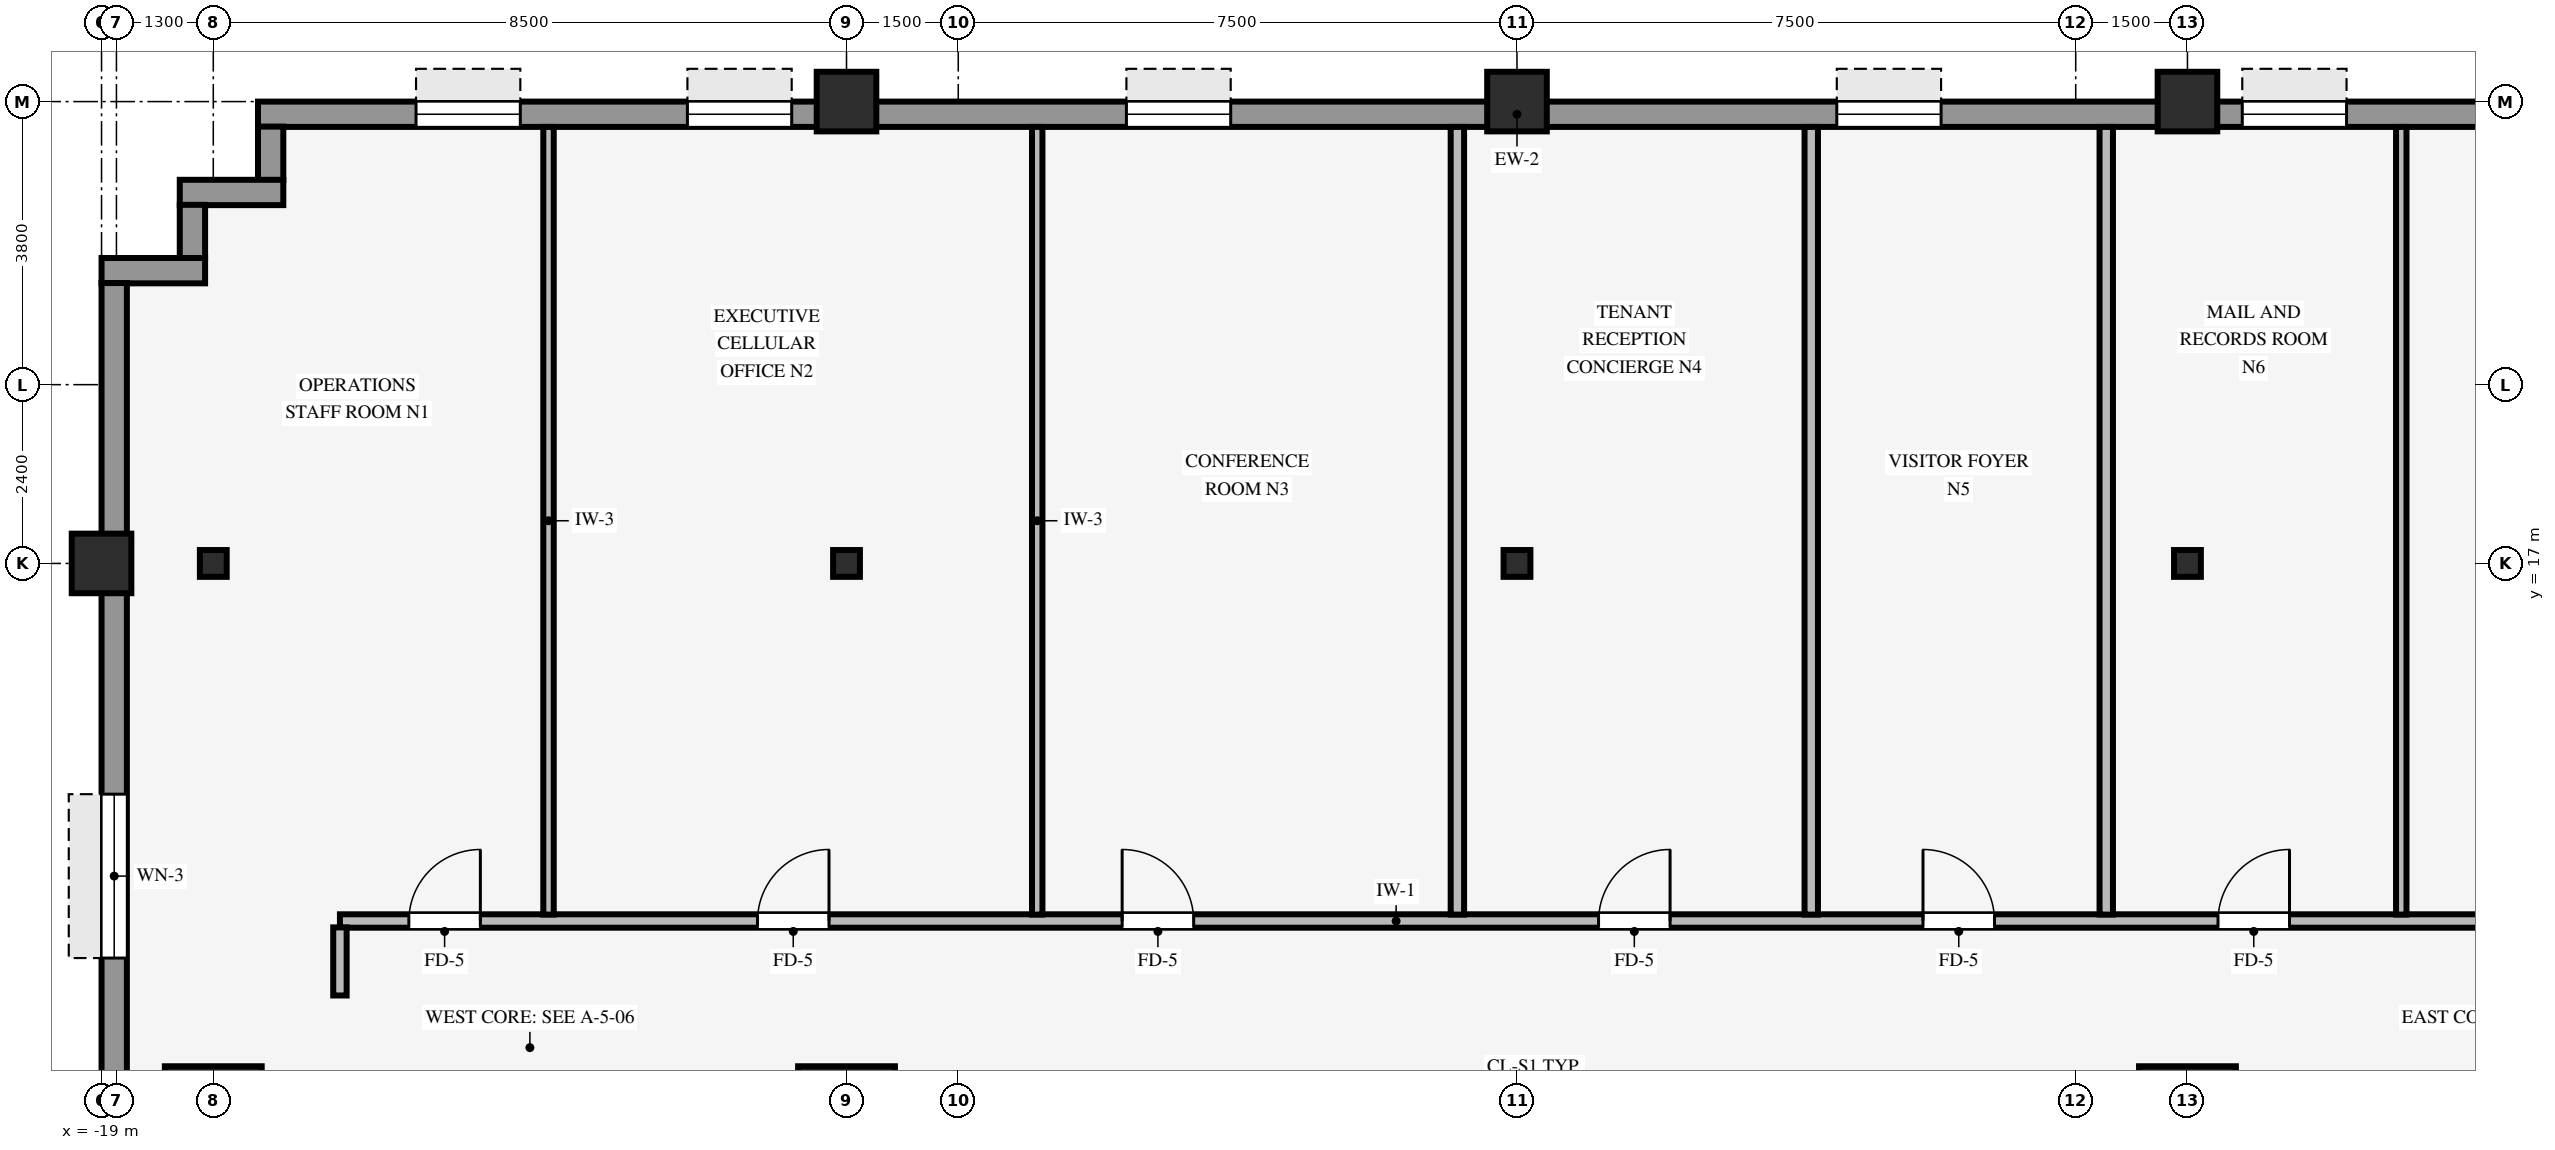
"""IFC4 building model, lengths in metres.
Left out: names, types, materials, properties, quantities, classifications, styles, units other than length and angle.
Written with IfcOpenShell. Run it as: python <this file> out.ifc"""

import sys

from ifc_helpers import new_model, si_unit, direction, frame, frame_2d, origin, origin_2d, place, context, subcontext, project, spatial, rectangle, hollow_rectangle, i_section, extrude, source, transform, mapped, element, fill, save


model = new_model("IFC4")
c1 = context("Model", 3, precision=1e-05, world=origin(), true_north=direction((0.0, 1.0)))
c2 = subcontext(c1, "Body", "Model", "MODEL_VIEW")
j1 = project(units=[si_unit("LENGTHUNIT", "METRE"), si_unit("PLANEANGLEUNIT", "RADIAN")], contexts=[c1])
p1 = place(None, origin())
s1 = spatial("IfcSite", under=j1, at=p1, CompositionType="ELEMENT")
p2 = place(p1, origin())
s2 = spatial("IfcBuilding", under=s1, at=p2, CompositionType="ELEMENT")
p3 = place(p2, frame((0.0, 0.0, 53.15)))
s3 = spatial("IfcBuildingStorey", under=s2, at=p3, CompositionType="ELEMENT", Elevation=53.15)
for number, where, z_axis, x_axis in (
    (1, (-17.5, 9.6, 0.0), (0.0, 0.0, 1.0), (1.0, 0.0, 0.0)),
    (2, (-9.0, 9.6, 0.0), (0.0, 0.0, 1.0), (1.0, 0.0, 0.0)),
    (3, (9.0, 9.6, 0.0), (0.0, 0.0, 1.0), (1.0, 0.0, 0.0)),
):
    element("IfcColumn", number, at=place(p3, frame(where, z_axis=z_axis, x_axis=x_axis)), inside=s3, PredefinedType="COLUMN", context=c2, shape_type="SweptSolid", body=[
        extrude(rectangle(XDim=1.3, YDim=1.3, at=origin_2d()), origin(), (0.0, 0.0, 1.0), 3.25),
    ])
for number, where, z_axis, x_axis in (
    (4, (-19.0, 17.0, 0.0), (0.0, 0.0, 1.0), (1.0, 0.0, 0.0)),
    (5, (-9.0, 23.2, 0.0), (0.0, 0.0, 1.0), (1.0, 0.0, 0.0)),
    (6, (0.0, 23.2, 0.0), (0.0, 0.0, 1.0), (1.0, 0.0, 0.0)),
    (7, (9.0, 23.2, 0.0), (0.0, 0.0, 1.0), (1.0, 0.0, 0.0)),
):
    element("IfcColumn", number, at=place(p3, frame(where, z_axis=z_axis, x_axis=x_axis)), inside=s3, PredefinedType="COLUMN", context=c2, shape_type="SweptSolid", body=[
        extrude(hollow_rectangle(XDim=0.8, YDim=0.8, WallThickness=0.055, InnerFilletRadius=0.055, OuterFilletRadius=0.11, at=origin_2d()), origin(), (0.0, 0.0, 1.0), 3.25),
    ])
for number, where, z_axis, x_axis in (
    (8, (0.0, 17.0, 0.0), (0.0, 0.0, 1.0), (1.0, 0.0, 0.0)),
    (9, (-17.5, 17.0, 0.0), (0.0, 0.0, 1.0), (1.0, 0.0, 0.0)),
    (10, (-9.0, 17.0, 0.0), (0.0, 0.0, 1.0), (1.0, 0.0, 0.0)),
    (11, (9.0, 17.0, 0.0), (0.0, 0.0, 1.0), (1.0, 0.0, 0.0)),
):
    element("IfcColumn", number, at=place(p3, frame(where, z_axis=z_axis, x_axis=x_axis)), inside=s3, PredefinedType="COLUMN", context=c2, shape_type="SweptSolid", body=[
        extrude(i_section(OverallWidth=0.36, OverallDepth=0.36, WebThickness=0.021, FlangeThickness=0.021, FilletRadius=0.018, at=origin_2d()), origin(), (0.0, 0.0, 1.0), 3.25),
    ])
p4 = place(p3, frame((-16.9, 23.03, 0.0), z_axis=(0.0, 0.0, 1.0), x_axis=(1.0, 0.0, 0.0)))
e12 = element("IfcWall", 12, at=p4, inside=s3, PredefinedType="STANDARD", context=c2, shape_type="SweptSolid", body=[
    extrude(rectangle(XDim=33.8, YDim=0.34, at=frame_2d((16.9, 0.0))), origin(), (0.0, 0.0, 1.0), 2.585),
])
p5 = place(p4, frame((2.121, 0.0, 0.8)))
e13 = element("IfcOpeningElement", 13, at=p5, cuts=e12, PredefinedType="OPENING", context=c2, shape_type="SweptSolid", body=[
    extrude(rectangle(XDim=1.4, YDim=1.65, at=frame_2d((0.7, 0.825))), frame((0.0, 0.18, 0.0), z_axis=(0.0, -1.0, 0.0), x_axis=(1.0, 0.0, 0.0)), (0.0, 0.0, 1.0), 0.36),
])
p6 = place(p4, frame((5.764, 0.0, 0.8)))
e14 = element("IfcOpeningElement", 14, at=p6, cuts=e12, PredefinedType="OPENING", context=c2, shape_type="SweptSolid", body=[
    extrude(rectangle(XDim=1.4, YDim=1.65, at=frame_2d((0.7, 0.825))), frame((0.0, 0.18, 0.0), z_axis=(0.0, -1.0, 0.0), x_axis=(1.0, 0.0, 0.0)), (0.0, 0.0, 1.0), 0.36),
])
p7 = place(p4, frame((11.657, 0.0, 0.8)))
e15 = element("IfcOpeningElement", 15, at=p7, cuts=e12, PredefinedType="OPENING", context=c2, shape_type="SweptSolid", body=[
    extrude(rectangle(XDim=1.4, YDim=1.65, at=frame_2d((0.7, 0.825))), frame((0.0, 0.18, 0.0), z_axis=(0.0, -1.0, 0.0), x_axis=(1.0, 0.0, 0.0)), (0.0, 0.0, 1.0), 0.36),
])
p8 = place(p4, frame((21.193, 0.0, 0.8)))
e16 = element("IfcOpeningElement", 16, at=p8, cuts=e12, PredefinedType="OPENING", context=c2, shape_type="SweptSolid", body=[
    extrude(rectangle(XDim=1.4, YDim=1.65, at=frame_2d((0.7, 0.825))), frame((0.0, 0.18, 0.0), z_axis=(0.0, -1.0, 0.0), x_axis=(1.0, 0.0, 0.0)), (0.0, 0.0, 1.0), 0.36),
])
p9 = place(p4, frame((26.636, 0.0, 0.8)))
e17 = element("IfcOpeningElement", 17, at=p9, cuts=e12, PredefinedType="OPENING", context=c2, shape_type="SweptSolid", body=[
    extrude(rectangle(XDim=1.4, YDim=1.65, at=frame_2d((0.7, 0.825))), frame((0.0, 0.18, 0.0), z_axis=(0.0, -1.0, 0.0), x_axis=(1.0, 0.0, 0.0)), (0.0, 0.0, 1.0), 0.36),
])
p10 = place(p4, frame((29.829, 0.0, 0.8)))
e18 = element("IfcOpeningElement", 18, at=p10, cuts=e12, PredefinedType="OPENING", context=c2, shape_type="SweptSolid", body=[
    extrude(rectangle(XDim=1.4, YDim=1.65, at=frame_2d((0.7, 0.825))), frame((0.0, 0.18, 0.0), z_axis=(0.0, -1.0, 0.0), x_axis=(1.0, 0.0, 0.0)), (0.0, 0.0, 1.0), 0.36),
])
p11 = place(p3, frame((-16.73, 22.146, 0.0), z_axis=(0.0, 0.0, 1.0), x_axis=(0.0, 1.0, 0.0)))
e19 = element("IfcWall", 19, at=p11, inside=s3, PredefinedType="STANDARD", context=c2, shape_type="SweptSolid", body=[
    extrude(rectangle(XDim=0.718, YDim=0.34, at=frame_2d((0.359, 0.0))), origin(), (0.0, 0.0, 1.0), 3.24),
])
p12 = place(p3, frame((-17.95, 21.98, 0.0), z_axis=(0.0, 0.0, 1.0), x_axis=(1.0, 0.0, 0.0)))
e20 = element("IfcWall", 20, at=p12, inside=s3, PredefinedType="STANDARD", context=c2, shape_type="SweptSolid", body=[
    extrude(rectangle(XDim=1.39, YDim=0.34, at=frame_2d((0.695, 0.0))), origin(), (0.0, 0.0, 1.0), 3.24),
])
p13 = place(p3, frame((-17.78, 21.096, 0.0), z_axis=(0.0, 0.0, 1.0), x_axis=(0.0, 1.0, 0.0)))
e21 = element("IfcWall", 21, at=p13, inside=s3, PredefinedType="STANDARD", context=c2, shape_type="SweptSolid", body=[
    extrude(rectangle(XDim=0.718, YDim=0.34, at=frame_2d((0.359, 0.0))), origin(), (0.0, 0.0, 1.0), 3.24),
])
p14 = place(p3, frame((-19.0, 20.93, 0.0), z_axis=(0.0, 0.0, 1.0), x_axis=(1.0, 0.0, 0.0)))
e22 = element("IfcWall", 22, at=p14, inside=s3, PredefinedType="STANDARD", context=c2, shape_type="SweptSolid", body=[
    extrude(rectangle(XDim=1.39, YDim=0.34, at=frame_2d((0.695, 0.0))), origin(), (0.0, 0.0, 1.0), 3.24),
])
p15 = place(p3, frame((-18.83, -20.764, 0.0), z_axis=(0.0, 0.0, 1.0), x_axis=(0.0, 1.0, 0.0)))
e23 = element("IfcWall", 23, at=p15, inside=s3, PredefinedType="STANDARD", context=c2, shape_type="SweptSolid", body=[
    extrude(rectangle(XDim=41.528, YDim=0.34, at=frame_2d((20.764, 0.0))), origin(), (0.0, 0.0, 1.0), 3.24),
])
p16 = place(p15, frame((6.864, 0.0, 0.0)))
e24 = element("IfcOpeningElement", 24, at=p16, cuts=e23, PredefinedType="OPENING", context=c2, shape_type="SweptSolid", body=[
    extrude(rectangle(XDim=1.05, YDim=2.1, at=frame_2d((0.525, 1.05))), frame((0.0, 0.18, 0.0), z_axis=(0.0, -1.0, 0.0), x_axis=(1.0, 0.0, 0.0)), (0.0, 0.0, 1.0), 0.36),
])
p17 = place(p15, frame((32.467, 0.0, 0.8)))
e25 = element("IfcOpeningElement", 25, at=p17, cuts=e23, PredefinedType="OPENING", context=c2, shape_type="SweptSolid", body=[
    extrude(rectangle(XDim=2.2, YDim=1.65, at=frame_2d((1.1, 0.825))), frame((0.0, 0.18, 0.0), z_axis=(0.0, -1.0, 0.0), x_axis=(1.0, 0.0, 0.0)), (0.0, 0.0, 1.0), 0.36),
])
p18 = place(p3, frame((-15.8, 12.2, 0.0), z_axis=(0.0, 0.0, 1.0), x_axis=(1.0, 0.0, 0.0)))
e26 = element("IfcWall", 26, at=p18, inside=s3, PredefinedType="PARTITIONING", context=c2, shape_type="SweptSolid", body=[
    extrude(rectangle(XDim=31.6, YDim=0.18, at=frame_2d((15.8, 0.0))), origin(), (0.0, 0.0, 1.0), 3.24),
])
p19 = place(p18, frame((5.605, 0.0, 0.0)))
e27 = element("IfcOpeningElement", 27, at=p19, cuts=e26, PredefinedType="OPENING", context=c2, shape_type="SweptSolid", body=[
    extrude(rectangle(XDim=0.96, YDim=2.1, at=frame_2d((0.48, 1.05))), frame((0.0, 0.1, 0.0), z_axis=(0.0, -1.0, 0.0), x_axis=(1.0, 0.0, 0.0)), (0.0, 0.0, 1.0), 0.2),
])
p20 = place(p18, frame((16.895, 0.0, 0.0)))
e28 = element("IfcOpeningElement", 28, at=p20, cuts=e26, PredefinedType="OPENING", context=c2, shape_type="SweptSolid", body=[
    extrude(rectangle(XDim=0.96, YDim=2.1, at=frame_2d((0.48, 1.05))), frame((0.0, 0.1, 0.0), z_axis=(0.0, -1.0, 0.0), x_axis=(1.0, 0.0, 0.0)), (0.0, 0.0, 1.0), 0.2),
])
p21 = place(p18, frame((21.25, 0.0, 0.0)))
e29 = element("IfcOpeningElement", 29, at=p21, cuts=e26, PredefinedType="OPENING", context=c2, shape_type="SweptSolid", body=[
    extrude(rectangle(XDim=0.96, YDim=2.1, at=frame_2d((0.48, 1.05))), frame((0.0, 0.1, 0.0), z_axis=(0.0, -1.0, 0.0), x_axis=(1.0, 0.0, 0.0)), (0.0, 0.0, 1.0), 0.2),
])
p22 = place(p18, frame((25.21, 0.0, 0.0)))
e30 = element("IfcOpeningElement", 30, at=p22, cuts=e26, PredefinedType="OPENING", context=c2, shape_type="SweptSolid", body=[
    extrude(rectangle(XDim=0.96, YDim=2.1, at=frame_2d((0.48, 1.05))), frame((0.0, 0.1, 0.0), z_axis=(0.0, -1.0, 0.0), x_axis=(1.0, 0.0, 0.0)), (0.0, 0.0, 1.0), 0.2),
])
p23 = place(p18, frame((29.155, 0.0, 0.0)))
e31 = element("IfcOpeningElement", 31, at=p23, cuts=e26, PredefinedType="OPENING", context=c2, shape_type="SweptSolid", body=[
    extrude(rectangle(XDim=0.96, YDim=2.1, at=frame_2d((0.48, 1.05))), frame((0.0, 0.1, 0.0), z_axis=(0.0, -1.0, 0.0), x_axis=(1.0, 0.0, 0.0)), (0.0, 0.0, 1.0), 0.2),
])
p24 = place(p18, frame((10.5, 0.0, 0.0)))
e32 = element("IfcOpeningElement", 32, at=p24, cuts=e26, PredefinedType="OPENING", context=c2, shape_type="SweptSolid", body=[
    extrude(rectangle(XDim=0.96, YDim=2.1, at=frame_2d((0.48, 1.05))), frame((0.0, 0.1, 0.0), z_axis=(0.0, -1.0, 0.0), x_axis=(1.0, 0.0, 0.0)), (0.0, 0.0, 1.0), 0.2),
])
p25 = place(p18, frame((0.925, 0.0, 0.0)))
e33 = element("IfcOpeningElement", 33, at=p25, cuts=e26, PredefinedType="OPENING", context=c2, shape_type="SweptSolid", body=[
    extrude(rectangle(XDim=0.96, YDim=2.1, at=frame_2d((0.48, 1.05))), frame((0.0, 0.1, 0.0), z_axis=(0.0, -1.0, 0.0), x_axis=(1.0, 0.0, 0.0)), (0.0, 0.0, 1.0), 0.2),
])
p26 = place(p3, frame((-15.8, 11.2, 0.0), z_axis=(0.0, 0.0, 1.0), x_axis=(0.0, 1.0, 0.0)))
e34 = element("IfcWall", 34, at=p26, inside=s3, PredefinedType="PARTITIONING", context=c2, shape_type="SweptSolid", body=[
    extrude(rectangle(XDim=0.914, YDim=0.18, at=frame_2d((0.457, 0.0))), origin(), (0.0, 0.0, 1.0), 3.24),
])
for number, where, z_axis, x_axis in (
    (35, (-13.0, 12.286, 0.0), (0.0, 0.0, 1.0), (0.0, 1.0, 0.0)),
    (36, (-6.44, 12.286, 0.0), (0.0, 0.0, 1.0), (0.0, 1.0, 0.0)),
):
    element("IfcWall", number, at=place(p3, frame(where, z_axis=z_axis, x_axis=x_axis)), inside=s3, PredefinedType="PARTITIONING", context=c2, shape_type="SweptSolid", body=[
        extrude(rectangle(XDim=10.574, YDim=0.14, at=frame_2d((5.287, 0.0))), origin(), (0.0, 0.0, 1.0), 3.24),
    ])
for number, where, z_axis, x_axis in (
    (37, (-0.8, 12.286, 0.0), (0.0, 0.0, 1.0), (0.0, 1.0, 0.0)),
    (38, (3.95, 12.286, 0.0), (0.0, 0.0, 1.0), (0.0, 1.0, 0.0)),
    (39, (7.91, 12.286, 0.0), (0.0, 0.0, 1.0), (0.0, 1.0, 0.0)),
):
    element("IfcWall", number, at=place(p3, frame(where, z_axis=z_axis, x_axis=x_axis)), inside=s3, PredefinedType="PARTITIONING", context=c2, shape_type="SweptSolid", body=[
        extrude(rectangle(XDim=10.574, YDim=0.18, at=frame_2d((5.287, 0.0))), origin(), (0.0, 0.0, 1.0), 3.24),
    ])
p27 = place(p3, frame((11.87, 12.286, 0.0), z_axis=(0.0, 0.0, 1.0), x_axis=(0.0, 1.0, 0.0)))
e40 = element("IfcWall", 40, at=p27, inside=s3, PredefinedType="PARTITIONING", context=c2, shape_type="SweptSolid", body=[
    extrude(rectangle(XDim=10.574, YDim=0.14, at=frame_2d((5.287, 0.0))), origin(), (0.0, 0.0, 1.0), 3.24),
])
m1 = source(origin(), c2, "Body", "SweptSolid", [
    extrude(rectangle(XDim=1.4, YDim=1.65, at=frame_2d((0.7, 0.825))), frame((0.0, 0.03, 0.0), z_axis=(0.0, -1.0, 0.0), x_axis=(1.0, 0.0, 0.0)), (0.0, 0.0, 1.0), 0.06),
])
p28 = place(p5, origin())
e41 = element("IfcWindow", 41, at=p28, inside=s3, PartitioningType="SINGLE_PANEL", PredefinedType="WINDOW", context=c2, shape_type="MappedRepresentation", body=[
    mapped(m1, transform((0.0, 0.0, 0.0), scale=1.0)),
])
fill(e13, e41)
p29 = place(p6, origin())
e42 = element("IfcWindow", 42, at=p29, inside=s3, PartitioningType="SINGLE_PANEL", PredefinedType="WINDOW", context=c2, shape_type="MappedRepresentation", body=[
    mapped(m1, transform((0.0, 0.0, 0.0), scale=1.0)),
])
fill(e14, e42)
p30 = place(p7, origin())
e43 = element("IfcWindow", 43, at=p30, inside=s3, PartitioningType="SINGLE_PANEL", PredefinedType="WINDOW", context=c2, shape_type="MappedRepresentation", body=[
    mapped(m1, transform((0.0, 0.0, 0.0), scale=1.0)),
])
fill(e15, e43)
p31 = place(p8, origin())
e44 = element("IfcWindow", 44, at=p31, inside=s3, PartitioningType="SINGLE_PANEL", PredefinedType="WINDOW", context=c2, shape_type="MappedRepresentation", body=[
    mapped(m1, transform((0.0, 0.0, 0.0), scale=1.0)),
])
fill(e16, e44)
p32 = place(p9, origin())
e45 = element("IfcWindow", 45, at=p32, inside=s3, PartitioningType="SINGLE_PANEL", PredefinedType="WINDOW", context=c2, shape_type="MappedRepresentation", body=[
    mapped(m1, transform((0.0, 0.0, 0.0), scale=1.0)),
])
fill(e17, e45)
m2 = source(origin(), c2, "Body", "SweptSolid", [
    extrude(rectangle(XDim=2.2, YDim=1.65, at=frame_2d((1.1, 0.825))), frame((0.0, 0.03, 0.0), z_axis=(0.0, -1.0, 0.0), x_axis=(1.0, 0.0, 0.0)), (0.0, 0.0, 1.0), 0.06),
])
p33 = place(p17, origin())
e46 = element("IfcWindow", 46, at=p33, inside=s3, PartitioningType="SINGLE_PANEL", PredefinedType="WINDOW", context=c2, shape_type="MappedRepresentation", body=[
    mapped(m2, transform((0.0, 0.0, 0.0), scale=1.0)),
])
fill(e25, e46)
m3 = source(origin(), c2, "Body", "SweptSolid", [
    extrude(rectangle(XDim=0.96, YDim=2.1, at=frame_2d((0.48, 1.05))), frame((0.0, 0.025, 0.0), z_axis=(0.0, -1.0, 0.0), x_axis=(1.0, 0.0, 0.0)), (0.0, 0.0, 1.0), 0.05),
])
p34 = place(p19, origin())
e47 = element("IfcDoor", 47, at=p34, inside=s3, OperationType="SINGLE_SWING_RIGHT", PredefinedType="DOOR", context=c2, shape_type="MappedRepresentation", body=[
    mapped(m3, transform((0.0, 0.0, 0.0), scale=1.0)),
])
fill(e27, e47)
p35 = place(p20, origin())
e48 = element("IfcDoor", 48, at=p35, inside=s3, OperationType="SINGLE_SWING_RIGHT", PredefinedType="DOOR", context=c2, shape_type="MappedRepresentation", body=[
    mapped(m3, transform((0.0, 0.0, 0.0), scale=1.0)),
])
fill(e28, e48)
p36 = place(p21, origin())
e49 = element("IfcDoor", 49, at=p36, inside=s3, OperationType="SINGLE_SWING_LEFT", PredefinedType="DOOR", context=c2, shape_type="MappedRepresentation", body=[
    mapped(m3, transform((0.0, 0.0, 0.0), scale=1.0)),
])
fill(e29, e49)
p37 = place(p22, origin())
e50 = element("IfcDoor", 50, at=p37, inside=s3, OperationType="SINGLE_SWING_RIGHT", PredefinedType="DOOR", context=c2, shape_type="MappedRepresentation", body=[
    mapped(m3, transform((0.0, 0.0, 0.0), scale=1.0)),
])
fill(e30, e50)
p38 = place(p24, origin())
e51 = element("IfcDoor", 51, at=p38, inside=s3, OperationType="SINGLE_SWING_LEFT", PredefinedType="DOOR", context=c2, shape_type="MappedRepresentation", body=[
    mapped(m3, transform((0.0, 0.0, 0.0), scale=1.0)),
])
fill(e32, e51)
p39 = place(p25, origin())
e52 = element("IfcDoor", 52, at=p39, inside=s3, OperationType="SINGLE_SWING_RIGHT", PredefinedType="DOOR", context=c2, shape_type="MappedRepresentation", body=[
    mapped(m3, transform((0.0, 0.0, 0.0), scale=1.0)),
])
fill(e33, e52)
save(model, sys.argv[1])
